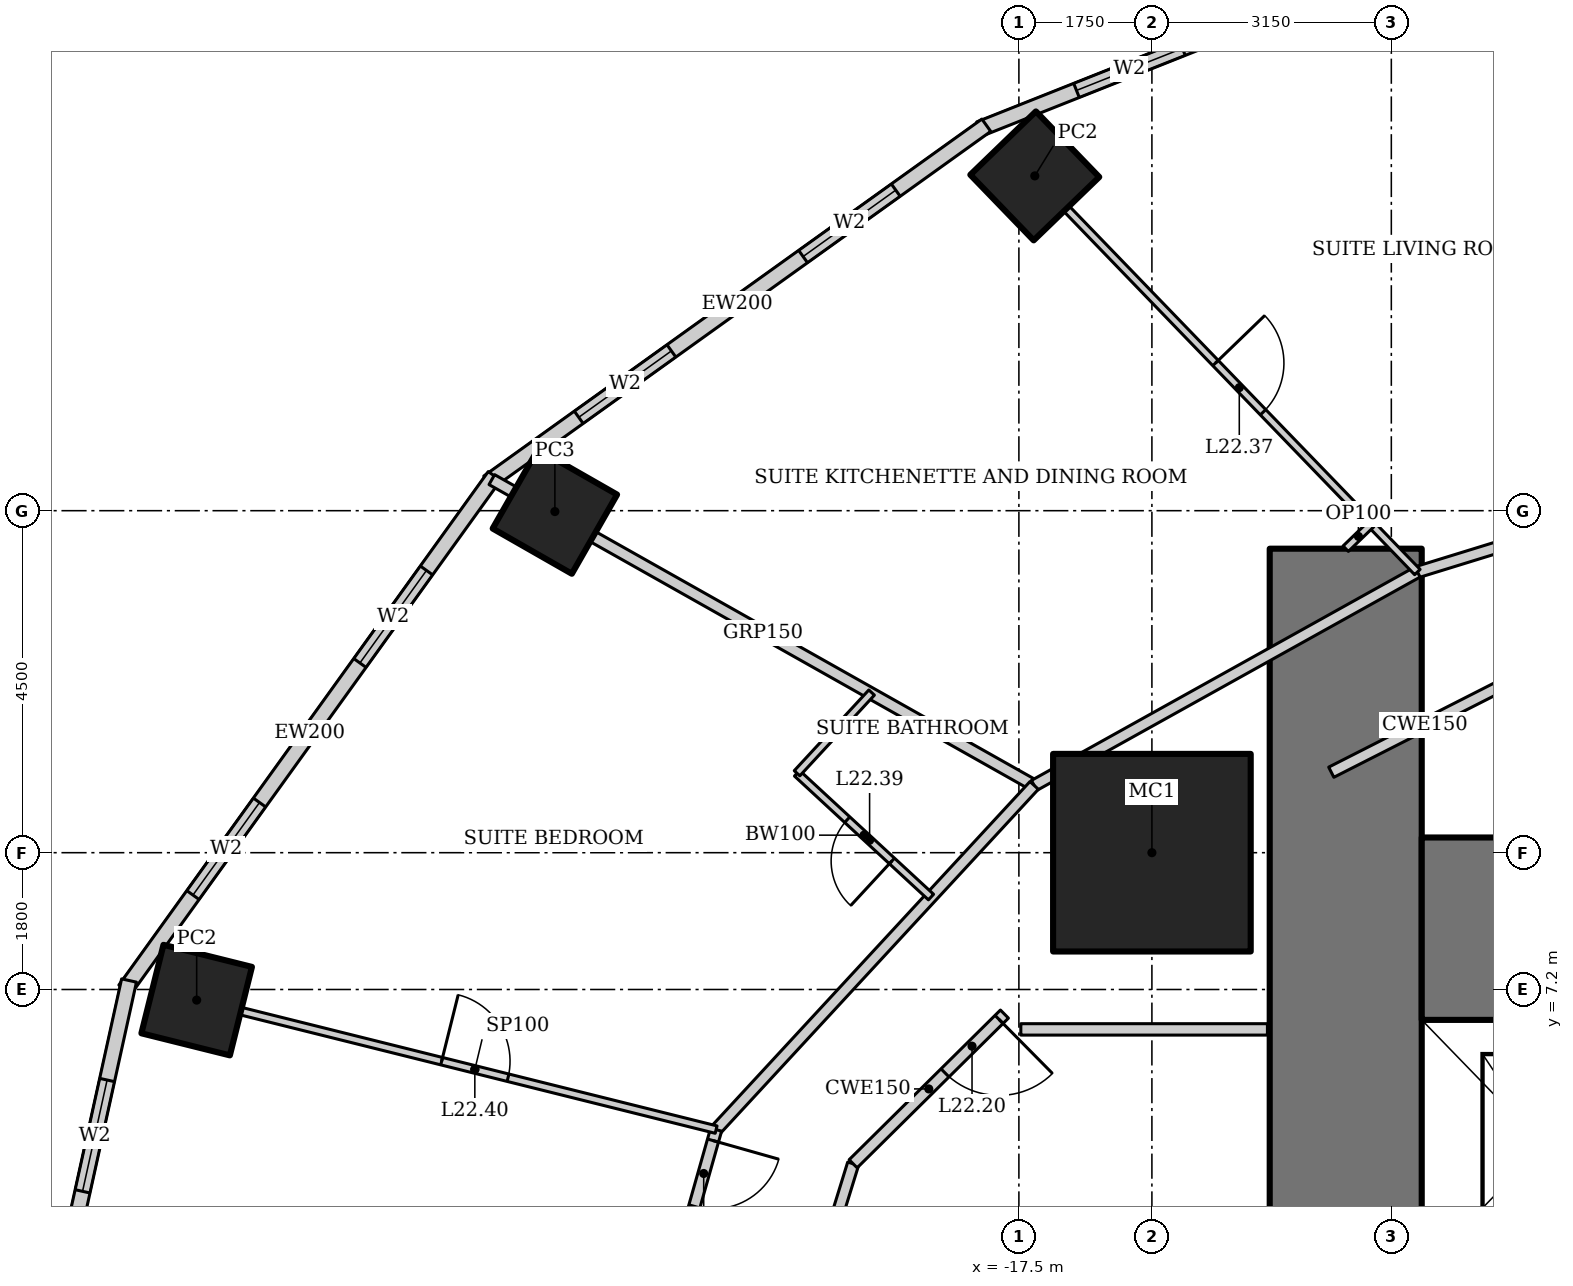
"""IFC4 building model, lengths in metres.
Left out: names, types, materials, properties, quantities, classifications, styles, units other than length and angle.
Written with IfcOpenShell. Run it as: python <this file> out.ifc"""

import sys

from ifc_helpers import new_model, si_unit, direction, frame, frame_2d, origin, origin_2d, place, context, subcontext, project, spatial, rectangle, hollow_rectangle, extrude, element, fill, save


model = new_model("IFC4")
c1 = context("Model", 3, precision=1e-05, world=origin(), true_north=direction((0.0, 1.0)))
c2 = subcontext(c1, "Body", "Model", "MODEL_VIEW")
j1 = project(units=[si_unit("LENGTHUNIT", "METRE"), si_unit("PLANEANGLEUNIT", "RADIAN")], contexts=[c1])
p1 = place(None, origin())
s1 = spatial("IfcSite", under=j1, at=p1, CompositionType="ELEMENT")
p2 = place(p1, origin())
s2 = spatial("IfcBuilding", under=s1, at=p2, CompositionType="ELEMENT")
p3 = place(p2, frame((0.0, 0.0, 94.6)))
s3 = spatial("IfcBuildingStorey", under=s2, at=p3, CompositionType="ELEMENT", Elevation=94.6)
p4 = place(p3, frame((-15.75, 9.0, 0.0), z_axis=(0.0, 0.0, 1.0), x_axis=(1.0, 0.0, 0.0)))
e1 = element("IfcColumn", 1, at=p4, inside=s3, PredefinedType="COLUMN", context=c2, shape_type="SweptSolid", body=[
    extrude(hollow_rectangle(XDim=2.6, YDim=2.6, WallThickness=0.13, at=origin_2d()), origin(), (0.0, 0.0, 1.0), 3.6),
])
p5 = place(p3, frame((-17.291, 17.905, 0.0), z_axis=(0.0, 0.0, 1.0), x_axis=(0.719339800339, 0.694658370459, 0.0)))
e2 = element("IfcColumn", 2, at=p5, inside=s3, PredefinedType="COLUMN", context=c2, shape_type="SweptSolid", body=[
    extrude(hollow_rectangle(XDim=1.2, YDim=1.2, WallThickness=0.1, at=origin_2d()), origin(), (0.0, 0.0, 1.0), 3.6),
])
p6 = place(p3, frame((-23.605, 13.489, 0.0), z_axis=(0.0, 0.0, 1.0), x_axis=(0.496139221777, 0.86824298017, 0.0)))
e3 = element("IfcColumn", 3, at=p6, inside=s3, PredefinedType="COLUMN", context=c2, shape_type="SweptSolid", body=[
    extrude(hollow_rectangle(XDim=1.2, YDim=1.2, WallThickness=0.12, at=origin_2d()), origin(), (0.0, 0.0, 1.0), 3.6),
])
p7 = place(p3, frame((-28.318, 7.06, 0.0), z_axis=(0.0, 0.0, 1.0), x_axis=(0.2419218956, 0.970295726276, 0.0)))
e4 = element("IfcColumn", 4, at=p7, inside=s3, PredefinedType="COLUMN", context=c2, shape_type="SweptSolid", body=[
    extrude(hollow_rectangle(XDim=1.2, YDim=1.2, WallThickness=0.1, at=origin_2d()), origin(), (0.0, 0.0, 1.0), 3.6),
])
p8 = place(p3, frame((-13.2, 13.0, 0.0), z_axis=(0.0, 0.0, 1.0), x_axis=(0.0, -1.0, 0.0)))
e5 = element("IfcWall", 5, at=p8, inside=s3, PredefinedType="SHEAR", context=c2, shape_type="SweptSolid", body=[
    extrude(rectangle(XDim=26.0, YDim=2.0, at=frame_2d((13.0, 0.0))), origin(), (0.0, 0.0, 1.0), 3.6),
])
p9 = place(p8, frame((12.1, 0.0, 0.0)))
e6 = element("IfcOpeningElement", 6, at=p9, cuts=e5, PredefinedType="OPENING", context=c2, shape_type="SweptSolid", body=[
    extrude(rectangle(XDim=1.8, YDim=2.1, at=frame_2d((0.9, 1.05))), frame((0.0, 1.01, 0.0), z_axis=(0.0, -1.0, 0.0), x_axis=(1.0, 0.0, 0.0)), (0.0, 0.0, 1.0), 2.02),
])
p10 = place(p3, frame((12.2, 8.0, 0.0), z_axis=(0.0, 0.0, 1.0), x_axis=(-1.0, 0.0, 0.0)))
e7 = element("IfcWall", 7, at=p10, inside=s3, PredefinedType="SHEAR", context=c2, shape_type="SweptSolid", body=[
    extrude(rectangle(XDim=24.4, YDim=2.4, at=frame_2d((12.2, 0.0))), origin(), (0.0, 0.0, 1.0), 3.6),
])
p11 = place(p3, frame((-10.869, 21.363, 0.0), z_axis=(0.0, 0.0, 1.0), x_axis=(-0.929358351251, -0.369178892895, 0.0)))
e8 = element("IfcWall", 8, at=p11, inside=s3, PredefinedType="SOLIDWALL", context=c2, shape_type="SweptSolid", body=[
    extrude(rectangle(XDim=7.692, YDim=0.2, at=frame_2d((3.846, 0.0))), origin(), (0.0, 0.0, 1.0), 3.45),
])
p12 = place(p11, frame((1.373, 0.0, 0.5)))
e9 = element("IfcOpeningElement", 9, at=p12, cuts=e8, PredefinedType="OPENING", context=c2, shape_type="SweptSolid", body=[
    extrude(rectangle(XDim=1.5, YDim=2.2, at=frame_2d((0.75, 1.1))), frame((0.0, 0.11, 0.0), z_axis=(0.0, -1.0, 0.0), x_axis=(1.0, 0.0, 0.0)), (0.0, 0.0, 1.0), 0.22),
])
p13 = place(p11, frame((4.819, 0.0, 0.5)))
e10 = element("IfcOpeningElement", 10, at=p13, cuts=e8, PredefinedType="OPENING", context=c2, shape_type="SweptSolid", body=[
    extrude(rectangle(XDim=1.5, YDim=2.2, at=frame_2d((0.75, 1.1))), frame((0.0, 0.11, 0.0), z_axis=(0.0, -1.0, 0.0), x_axis=(1.0, 0.0, 0.0)), (0.0, 0.0, 1.0), 0.22),
])
p14 = place(p3, frame((-17.929, 18.572, 0.0), z_axis=(0.0, 0.0, 1.0), x_axis=(-0.812791321576, -0.582554948112, 0.0)))
e11 = element("IfcWall", 11, at=p14, inside=s3, PredefinedType="SOLIDWALL", context=c2, shape_type="SweptSolid", body=[
    extrude(rectangle(XDim=8.063, YDim=0.2, at=frame_2d((4.032, 0.0))), origin(), (0.0, 0.0, 1.0), 3.45),
])
p15 = place(p14, frame((1.466, 0.0, 0.5)))
e12 = element("IfcOpeningElement", 12, at=p15, cuts=e11, PredefinedType="OPENING", context=c2, shape_type="SweptSolid", body=[
    extrude(rectangle(XDim=1.5, YDim=2.2, at=frame_2d((0.75, 1.1))), frame((0.0, 0.11, 0.0), z_axis=(0.0, -1.0, 0.0), x_axis=(1.0, 0.0, 0.0)), (0.0, 0.0, 1.0), 0.22),
])
p16 = place(p14, frame((5.097, 0.0, 0.5)))
e13 = element("IfcOpeningElement", 13, at=p16, cuts=e11, PredefinedType="OPENING", context=c2, shape_type="SweptSolid", body=[
    extrude(rectangle(XDim=1.5, YDim=2.2, at=frame_2d((0.75, 1.1))), frame((0.0, 0.11, 0.0), z_axis=(0.0, -1.0, 0.0), x_axis=(1.0, 0.0, 0.0)), (0.0, 0.0, 1.0), 0.22),
])
p17 = place(p3, frame((-24.4, 13.957, 0.0), z_axis=(0.0, 0.0, 1.0), x_axis=(-0.583937613703, -0.811798536155, 0.0)))
e14 = element("IfcWall", 14, at=p17, inside=s3, PredefinedType="SOLIDWALL", context=c2, shape_type="SweptSolid", body=[
    extrude(rectangle(XDim=8.323, YDim=0.2, at=frame_2d((4.162, 0.0))), origin(), (0.0, 0.0, 1.0), 3.45),
])
p18 = place(p17, frame((1.531, 0.0, 0.5)))
e15 = element("IfcOpeningElement", 15, at=p18, cuts=e14, PredefinedType="OPENING", context=c2, shape_type="SweptSolid", body=[
    extrude(rectangle(XDim=1.5, YDim=2.2, at=frame_2d((0.75, 1.1))), frame((0.0, 0.11, 0.0), z_axis=(0.0, -1.0, 0.0), x_axis=(1.0, 0.0, 0.0)), (0.0, 0.0, 1.0), 0.22),
])
p19 = place(p17, frame((5.292, 0.0, 0.5)))
e16 = element("IfcOpeningElement", 16, at=p19, cuts=e14, PredefinedType="OPENING", context=c2, shape_type="SweptSolid", body=[
    extrude(rectangle(XDim=1.5, YDim=2.2, at=frame_2d((0.75, 1.1))), frame((0.0, 0.11, 0.0), z_axis=(0.0, -1.0, 0.0), x_axis=(1.0, 0.0, 0.0)), (0.0, 0.0, 1.0), 0.22),
])
p20 = place(p3, frame((-29.208, 7.318, 0.0), z_axis=(0.0, 0.0, 1.0), x_axis=(-0.215238065514, -0.976561608478, 0.0)))
e17 = element("IfcWall", 17, at=p20, inside=s3, PredefinedType="SOLIDWALL", context=c2, shape_type="SweptSolid", body=[
    extrude(rectangle(XDim=7.562, YDim=0.2, at=frame_2d((3.781, 0.0))), origin(), (0.0, 0.0, 1.0), 3.45),
])
p21 = place(p20, frame((1.341, 0.0, 0.5)))
e18 = element("IfcOpeningElement", 18, at=p21, cuts=e17, PredefinedType="OPENING", context=c2, shape_type="SweptSolid", body=[
    extrude(rectangle(XDim=1.5, YDim=2.2, at=frame_2d((0.75, 1.1))), frame((0.0, 0.11, 0.0), z_axis=(0.0, -1.0, 0.0), x_axis=(1.0, 0.0, 0.0)), (0.0, 0.0, 1.0), 0.22),
])
p22 = place(p20, frame((4.722, 0.0, 0.5)))
e19 = element("IfcOpeningElement", 19, at=p22, cuts=e17, PredefinedType="OPENING", context=c2, shape_type="SweptSolid", body=[
    extrude(rectangle(XDim=1.5, YDim=2.2, at=frame_2d((0.75, 1.1))), frame((0.0, 0.11, 0.0), z_axis=(0.0, -1.0, 0.0), x_axis=(1.0, 0.0, 0.0)), (0.0, 0.0, 1.0), 0.22),
])
p23 = place(p3, frame((-24.435, 13.909, 0.0), z_axis=(0.0, 0.0, 1.0), x_axis=(0.871075246657, -0.491149584813, 0.0)))
e20 = element("IfcWall", 20, at=p23, inside=s3, PredefinedType="PARTITIONING", context=c2, shape_type="SweptSolid", body=[
    extrude(rectangle(XDim=8.192, YDim=0.15, at=frame_2d((4.096, 0.0))), origin(), (0.0, 0.0, 1.0), 2.693),
])
p24 = place(p3, frame((-7.253, 14.235, 0.0), z_axis=(0.0, 0.0, 1.0), x_axis=(-0.955657956744, -0.294478980085, 0.0)))
e21 = element("IfcWall", 21, at=p24, inside=s3, PredefinedType="PARTITIONING", context=c2, shape_type="SweptSolid", body=[
    extrude(rectangle(XDim=5.236, YDim=0.15, at=frame_2d((2.618, 0.0))), origin(), (0.0, 0.0, 1.0), 3.45),
])
p25 = place(p24, frame((0.15, 0.0, 0.0)))
e22 = element("IfcOpeningElement", 22, at=p25, cuts=e21, PredefinedType="OPENING", context=c2, shape_type="SweptSolid", body=[
    extrude(rectangle(XDim=0.9, YDim=2.1, at=frame_2d((0.45, 1.05))), frame((0.0, 0.085, 0.0), z_axis=(0.0, -1.0, 0.0), x_axis=(1.0, 0.0, 0.0)), (0.0, 0.0, 1.0), 0.17),
])
p26 = place(p3, frame((-12.257, 12.693, 0.0), z_axis=(0.0, 0.0, 1.0), x_axis=(-0.873695910579, -0.486472461541, 0.0)))
e23 = element("IfcWall", 23, at=p26, inside=s3, PredefinedType="PARTITIONING", context=c2, shape_type="SweptSolid", body=[
    extrude(rectangle(XDim=5.771, YDim=0.15, at=frame_2d((2.885, 0.0))), origin(), (0.0, 0.0, 1.0), 3.45),
])
p27 = place(p3, frame((-17.299, 9.885, 0.0), z_axis=(0.0, 0.0, 1.0), x_axis=(-0.678641806296, -0.734469399463, 0.0)))
e24 = element("IfcWall", 24, at=p27, inside=s3, PredefinedType="PARTITIONING", context=c2, shape_type="SweptSolid", body=[
    extrude(rectangle(XDim=6.166, YDim=0.15, at=frame_2d((3.083, 0.0))), origin(), (0.0, 0.0, 1.0), 3.45),
])
p28 = place(p3, frame((-21.484, 5.356, 0.0), z_axis=(0.0, 0.0, 1.0), x_axis=(-0.272386051236, -0.962188047677, 0.0)))
e25 = element("IfcWall", 25, at=p28, inside=s3, PredefinedType="PARTITIONING", context=c2, shape_type="SweptSolid", body=[
    extrude(rectangle(XDim=5.567, YDim=0.15, at=frame_2d((2.783, 0.0))), origin(), (0.0, 0.0, 1.0), 3.45),
])
p29 = place(p28, frame((0.15, 0.0, 0.0)))
e26 = element("IfcOpeningElement", 26, at=p29, cuts=e25, PredefinedType="OPENING", context=c2, shape_type="SweptSolid", body=[
    extrude(rectangle(XDim=0.9, YDim=2.1, at=frame_2d((0.45, 1.05))), frame((0.0, 0.085, 0.0), z_axis=(0.0, -1.0, 0.0), x_axis=(1.0, 0.0, 0.0)), (0.0, 0.0, 1.0), 0.17),
])
p30 = place(p3, frame((-19.681, 4.907, 0.0), z_axis=(0.0, 0.0, 1.0), x_axis=(-0.295778570807, -0.955256529447, 0.0)))
e27 = element("IfcWall", 27, at=p30, inside=s3, PredefinedType="PARTITIONING", context=c2, shape_type="SweptSolid", body=[
    extrude(rectangle(XDim=4.195, YDim=0.15, at=frame_2d((2.097, 0.0))), origin(), (0.0, 0.0, 1.0), 3.45),
])
p31 = place(p3, frame((-16.944, 17.545, 0.0), z_axis=(0.0, 0.0, 1.0), x_axis=(0.694677175107, -0.719321640426, 0.0)))
e28 = element("IfcWall", 28, at=p31, inside=s3, PredefinedType="PARTITIONING", context=c2, shape_type="SweptSolid", body=[
    extrude(rectangle(XDim=6.746, YDim=0.1, at=frame_2d((3.373, 0.0))), origin(), (0.0, 0.0, 1.0), 2.528),
])
p32 = place(p31, frame((2.923, 0.0, 0.0)))
e29 = element("IfcOpeningElement", 29, at=p32, cuts=e28, PredefinedType="OPENING", context=c2, shape_type="SweptSolid", body=[
    extrude(rectangle(XDim=0.9, YDim=2.1, at=frame_2d((0.45, 1.05))), frame((0.0, 0.06, 0.0), z_axis=(0.0, -1.0, 0.0), x_axis=(1.0, 0.0, 0.0)), (0.0, 0.0, 1.0), 0.12),
])
p33 = place(p3, frame((-18.656, 8.416, 0.0), z_axis=(0.0, 0.0, 1.0), x_axis=(-0.73447964986, 0.678630712495, 0.0)))
e30 = element("IfcWall", 30, at=p33, inside=s3, PredefinedType="PARTITIONING", context=c2, shape_type="SweptSolid", body=[
    extrude(rectangle(XDim=2.4, YDim=0.1, at=frame_2d((1.2, 0.0))), origin(), (0.0, 0.0, 1.0), 3.45),
])
p34 = place(p33, frame((0.7, 0.0, 0.0)))
e31 = element("IfcOpeningElement", 31, at=p34, cuts=e30, PredefinedType="OPENING", context=c2, shape_type="SweptSolid", body=[
    extrude(rectangle(XDim=0.8, YDim=2.1, at=frame_2d((0.4, 1.05))), frame((0.0, 0.06, 0.0), z_axis=(0.0, -1.0, 0.0), x_axis=(1.0, 0.0, 0.0)), (0.0, 0.0, 1.0), 0.12),
])
p35 = place(p3, frame((-20.419, 10.045, 0.0), z_axis=(0.0, 0.0, 1.0), x_axis=(0.67861657312, 0.734492713842, 0.0)))
e32 = element("IfcWall", 32, at=p35, inside=s3, PredefinedType="PARTITIONING", context=c2, shape_type="SweptSolid", body=[
    extrude(rectangle(XDim=1.446, YDim=0.1, at=frame_2d((0.723, 0.0))), origin(), (0.0, 0.0, 1.0), 3.45),
])
p36 = place(p3, frame((-27.833, 6.939, 0.0), z_axis=(0.0, 0.0, 1.0), x_axis=(0.970295936837, -0.241921051083, 0.0)))
e33 = element("IfcWall", 33, at=p36, inside=s3, PredefinedType="PARTITIONING", context=c2, shape_type="SweptSolid", body=[
    extrude(rectangle(XDim=6.543, YDim=0.1, at=frame_2d((3.272, 0.0))), origin(), (0.0, 0.0, 1.0), 2.332),
])
p37 = place(p36, frame((2.822, 0.0, 0.0)))
e34 = element("IfcOpeningElement", 34, at=p37, cuts=e33, PredefinedType="OPENING", context=c2, shape_type="SweptSolid", body=[
    extrude(rectangle(XDim=0.9, YDim=2.1, at=frame_2d((0.45, 1.05))), frame((0.0, 0.06, 0.0), z_axis=(0.0, -1.0, 0.0), x_axis=(1.0, 0.0, 0.0)), (0.0, 0.0, 1.0), 0.12),
])
p38 = place(p3, frame((-13.2, 13.0, 0.0), z_axis=(0.0, 0.0, 1.0), x_axis=(0.719347134512, 0.69465077562, 0.0)))
e35 = element("IfcWall", 35, at=p38, inside=s3, PredefinedType="PARTITIONING", context=c2, shape_type="SweptSolid", body=[
    extrude(rectangle(XDim=0.465, YDim=0.1, at=frame_2d((0.232, 0.0))), origin(), (0.0, 0.0, 1.0), 3.45),
])
p39 = place(p3, frame((-10.924, 11.312, 0.0), z_axis=(0.0, 0.0, 1.0), x_axis=(-0.891388152271, -0.453240732935, 0.0)))
e36 = element("IfcWall", 36, at=p39, inside=s3, PredefinedType="PARTITIONING", context=c2, shape_type="SweptSolid", body=[
    extrude(rectangle(XDim=2.766, YDim=0.15, at=frame_2d((1.383, 0.0))), origin(), (0.0, 0.0, 1.0), 3.45),
])
p40 = place(p3, frame((-17.69, 6.876, 0.0), z_axis=(0.0, 0.0, 1.0), x_axis=(-0.710845937688, -0.70334774676, 0.0)))
e37 = element("IfcWall", 37, at=p40, inside=s3, PredefinedType="PARTITIONING", context=c2, shape_type="SweptSolid", body=[
    extrude(rectangle(XDim=2.8, YDim=0.15, at=frame_2d((1.4, 0.0))), origin(), (0.0, 0.0, 1.0), 3.45),
])
p41 = place(p40, frame((0.1, 0.0, 0.0)))
e38 = element("IfcOpeningElement", 38, at=p41, cuts=e37, PredefinedType="OPENING", context=c2, shape_type="SweptSolid", body=[
    extrude(rectangle(XDim=1.0, YDim=2.1, at=frame_2d((0.5, 1.05))), frame((0.0, 0.085, 0.0), z_axis=(0.0, -1.0, 0.0), x_axis=(1.0, 0.0, 0.0)), (0.0, 0.0, 1.0), 0.17),
])
p42 = place(p3, frame((-14.23, 6.675, 0.0), z_axis=(0.0, 0.0, 1.0), x_axis=(-1.0, 0.0, 0.0)))
e39 = element("IfcWall", 39, at=p42, inside=s3, PredefinedType="PARTITIONING", context=c2, shape_type="SweptSolid", body=[
    extrude(rectangle(XDim=3.245, YDim=0.15, at=frame_2d((1.622, 0.0))), origin(), (0.0, 0.0, 1.0), 3.45),
])
p43 = place(p13, origin())
e40 = element("IfcWindow", 40, at=p43, inside=s3, PartitioningType="SINGLE_PANEL", PredefinedType="WINDOW", context=c2, shape_type="SweptSolid", body=[
    extrude(rectangle(XDim=1.5, YDim=2.2, at=frame_2d((0.75, 1.1))), frame((0.0, 0.03, 0.0), z_axis=(0.0, -1.0, 0.0), x_axis=(1.0, 0.0, 0.0)), (0.0, 0.0, 1.0), 0.06),
])
fill(e10, e40)
p44 = place(p15, origin())
e41 = element("IfcWindow", 41, at=p44, inside=s3, PartitioningType="SINGLE_PANEL", PredefinedType="WINDOW", context=c2, shape_type="SweptSolid", body=[
    extrude(rectangle(XDim=1.5, YDim=2.2, at=frame_2d((0.75, 1.1))), frame((0.0, 0.03, 0.0), z_axis=(0.0, -1.0, 0.0), x_axis=(1.0, 0.0, 0.0)), (0.0, 0.0, 1.0), 0.06),
])
fill(e12, e41)
p45 = place(p16, origin())
e42 = element("IfcWindow", 42, at=p45, inside=s3, PartitioningType="SINGLE_PANEL", PredefinedType="WINDOW", context=c2, shape_type="SweptSolid", body=[
    extrude(rectangle(XDim=1.5, YDim=2.2, at=frame_2d((0.75, 1.1))), frame((0.0, 0.03, 0.0), z_axis=(0.0, -1.0, 0.0), x_axis=(1.0, 0.0, 0.0)), (0.0, 0.0, 1.0), 0.06),
])
fill(e13, e42)
p46 = place(p18, origin())
e43 = element("IfcWindow", 43, at=p46, inside=s3, PartitioningType="SINGLE_PANEL", PredefinedType="WINDOW", context=c2, shape_type="SweptSolid", body=[
    extrude(rectangle(XDim=1.5, YDim=2.2, at=frame_2d((0.75, 1.1))), frame((0.0, 0.03, 0.0), z_axis=(0.0, -1.0, 0.0), x_axis=(1.0, 0.0, 0.0)), (0.0, 0.0, 1.0), 0.06),
])
fill(e15, e43)
p47 = place(p19, origin())
e44 = element("IfcWindow", 44, at=p47, inside=s3, PartitioningType="SINGLE_PANEL", PredefinedType="WINDOW", context=c2, shape_type="SweptSolid", body=[
    extrude(rectangle(XDim=1.5, YDim=2.2, at=frame_2d((0.75, 1.1))), frame((0.0, 0.03, 0.0), z_axis=(0.0, -1.0, 0.0), x_axis=(1.0, 0.0, 0.0)), (0.0, 0.0, 1.0), 0.06),
])
fill(e16, e44)
p48 = place(p21, origin())
e45 = element("IfcWindow", 45, at=p48, inside=s3, PartitioningType="SINGLE_PANEL", PredefinedType="WINDOW", context=c2, shape_type="SweptSolid", body=[
    extrude(rectangle(XDim=1.5, YDim=2.2, at=frame_2d((0.75, 1.1))), frame((0.0, 0.03, 0.0), z_axis=(0.0, -1.0, 0.0), x_axis=(1.0, 0.0, 0.0)), (0.0, 0.0, 1.0), 0.06),
])
fill(e18, e45)
p49 = place(p41, origin())
e46 = element("IfcDoor", 46, at=p49, inside=s3, OperationType="SINGLE_SWING_LEFT", PredefinedType="DOOR", context=c2, shape_type="SweptSolid", body=[
    extrude(rectangle(XDim=1.0, YDim=2.1, at=frame_2d((0.5, 1.05))), frame((0.0, 0.025, 0.0), z_axis=(0.0, -1.0, 0.0), x_axis=(1.0, 0.0, 0.0)), (0.0, 0.0, 1.0), 0.05),
])
fill(e38, e46)
p50 = place(p32, origin())
e47 = element("IfcDoor", 47, at=p50, inside=s3, OperationType="SINGLE_SWING_LEFT", PredefinedType="DOOR", context=c2, shape_type="SweptSolid", body=[
    extrude(rectangle(XDim=0.9, YDim=2.1, at=frame_2d((0.45, 1.05))), frame((0.0, 0.025, 0.0), z_axis=(0.0, -1.0, 0.0), x_axis=(1.0, 0.0, 0.0)), (0.0, 0.0, 1.0), 0.05),
])
fill(e29, e47)
p51 = place(p34, origin())
e48 = element("IfcDoor", 48, at=p51, inside=s3, OperationType="SINGLE_SWING_LEFT", PredefinedType="DOOR", context=c2, shape_type="SweptSolid", body=[
    extrude(rectangle(XDim=0.8, YDim=2.1, at=frame_2d((0.4, 1.05))), frame((0.0, 0.025, 0.0), z_axis=(0.0, -1.0, 0.0), x_axis=(1.0, 0.0, 0.0)), (0.0, 0.0, 1.0), 0.05),
])
fill(e31, e48)
p52 = place(p37, origin())
e49 = element("IfcDoor", 49, at=p52, inside=s3, OperationType="SINGLE_SWING_LEFT", PredefinedType="DOOR", context=c2, shape_type="SweptSolid", body=[
    extrude(rectangle(XDim=0.9, YDim=2.1, at=frame_2d((0.45, 1.05))), frame((0.0, 0.025, 0.0), z_axis=(0.0, -1.0, 0.0), x_axis=(1.0, 0.0, 0.0)), (0.0, 0.0, 1.0), 0.05),
])
fill(e34, e49)
p53 = place(p29, origin())
e50 = element("IfcDoor", 50, at=p53, inside=s3, OperationType="SINGLE_SWING_LEFT", PredefinedType="DOOR", context=c2, shape_type="SweptSolid", body=[
    extrude(rectangle(XDim=0.9, YDim=2.1, at=frame_2d((0.45, 1.05))), frame((0.0, 0.025, 0.0), z_axis=(0.0, -1.0, 0.0), x_axis=(1.0, 0.0, 0.0)), (0.0, 0.0, 1.0), 0.05),
])
fill(e26, e50)
save(model, sys.argv[1])
